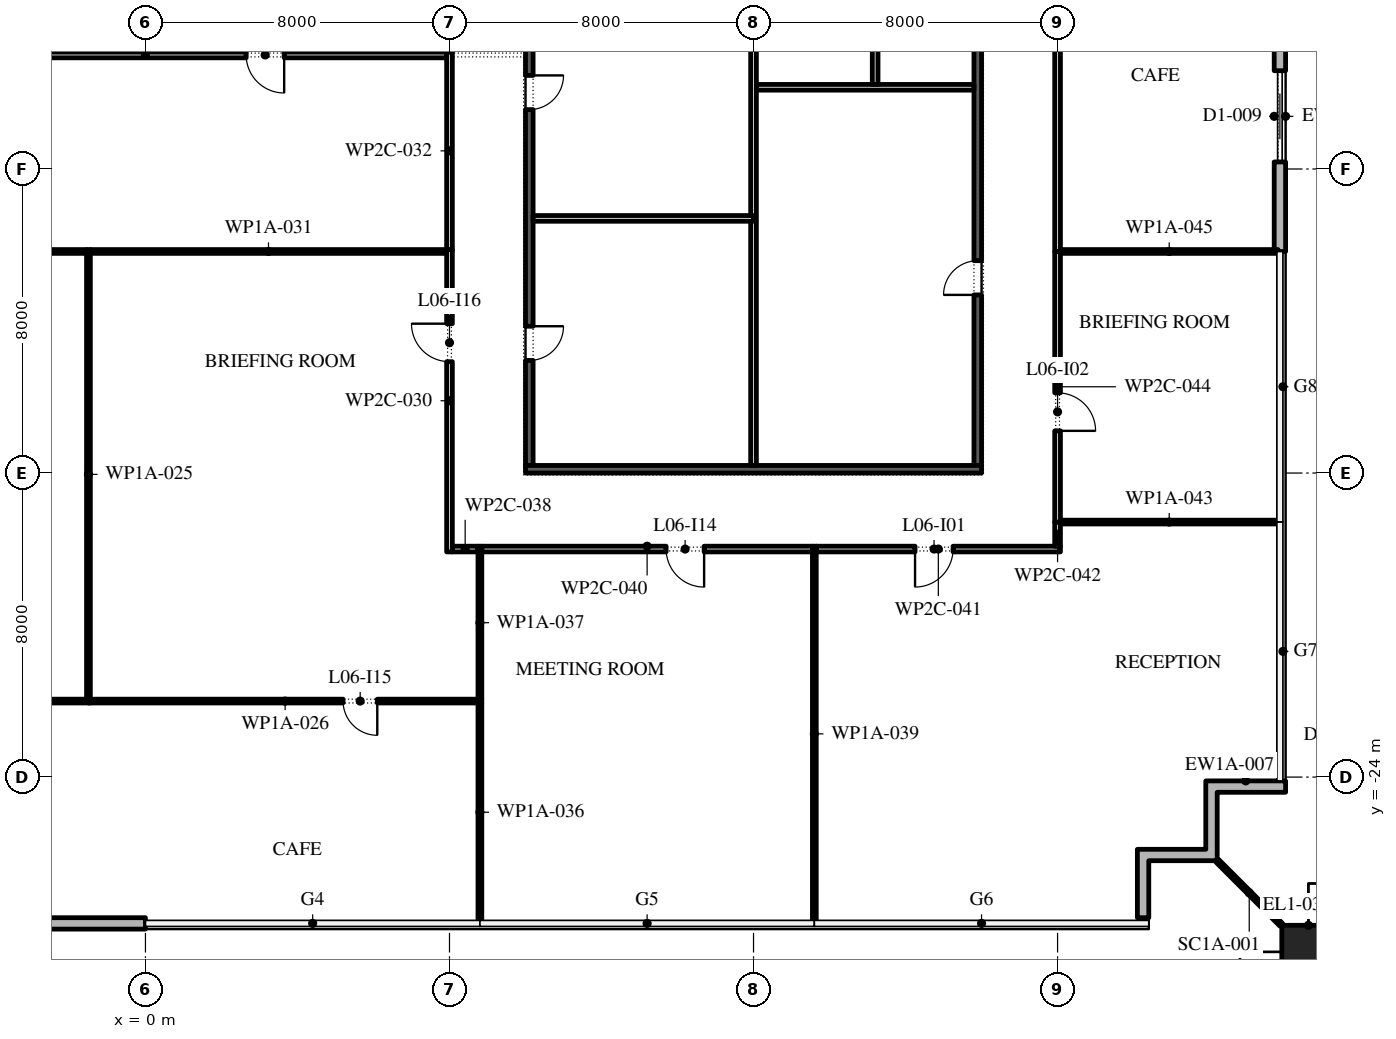
"""IFC4 building model, lengths in metres.
Left out: names, types, materials, properties, quantities, classifications, styles, units other than length and angle.
Written with IfcOpenShell. Run it as: python <this file> out.ifc"""

import sys

from ifc_helpers import new_model, si_unit, direction, frame, frame_2d, origin, origin_2d, place, context, subcontext, project, spatial, polyline, rectangle, outline, extrude, element, fill, save


model = new_model("IFC4")
c1 = context("Model", 3, precision=1e-05, world=origin(), true_north=direction((0.0, 1.0)))
c2 = subcontext(c1, "Body", "Model", "MODEL_VIEW")
j1 = project(units=[si_unit("LENGTHUNIT", "METRE"), si_unit("PLANEANGLEUNIT", "RADIAN")], contexts=[c1])
p1 = place(None, origin())
s1 = spatial("IfcSite", under=j1, at=p1, CompositionType="ELEMENT")
p2 = place(p1, origin())
s2 = spatial("IfcBuilding", under=s1, at=p2, CompositionType="ELEMENT")
p3 = place(p2, frame((0.0, 0.0, 33.6)))
s3 = spatial("IfcBuildingStorey", under=s2, at=p3, CompositionType="ELEMENT", Elevation=33.6)
p4 = place(p3, frame((30.6, -28.6, 0.0), z_axis=(0.0, 0.0, 1.0), x_axis=(1.0, 0.0, 0.0)))
e1 = element("IfcColumn", 1, at=p4, inside=s3, PredefinedType="COLUMN", context=c2, shape_type="SweptSolid", body=[
    extrude(rectangle(XDim=1.4, YDim=1.4, at=origin_2d()), origin(), (0.0, 0.0, 1.0), 6.0),
])
p5 = place(p3, frame((-8.8, -27.85, 0.0), z_axis=(0.0, 0.0, 1.0), x_axis=(1.0, 0.0, 0.0)))
e2 = element("IfcWall", 2, at=p5, inside=s3, PredefinedType="STANDARD", context=c2, shape_type="SweptSolid", body=[
    extrude(rectangle(XDim=8.8, YDim=0.3, at=frame_2d((4.4, 0.0))), origin(), (0.0, 0.0, 1.0), 5.8),
])
p6 = place(p5, frame((3.2, 0.0, 0.0)))
e3 = element("IfcOpeningElement", 3, at=p6, cuts=e2, PredefinedType="OPENING", context=c2, shape_type="SweptSolid", body=[
    extrude(rectangle(XDim=2.4, YDim=3.5, at=frame_2d((1.2, 1.75))), frame((0.0, 0.16, 0.0), z_axis=(0.0, -1.0, 0.0), x_axis=(1.0, 0.0, 0.0)), (0.0, 0.0, 1.0), 0.32),
])
p7 = place(p3, frame((29.85, -10.171, 0.0), z_axis=(0.0, 0.0, 1.0), x_axis=(0.0, 1.0, 0.0)))
e4 = element("IfcWall", 4, at=p7, inside=s3, PredefinedType="STANDARD", context=c2, shape_type="SweptSolid", body=[
    extrude(rectangle(XDim=7.114, YDim=0.3, at=frame_2d((3.557, 0.0))), origin(), (0.0, 0.0, 1.0), 5.8),
])
p8 = place(p7, frame((2.357, 0.0, 0.0)))
e5 = element("IfcOpeningElement", 5, at=p8, cuts=e4, PredefinedType="OPENING", context=c2, shape_type="SweptSolid", body=[
    extrude(rectangle(XDim=2.4, YDim=3.5, at=frame_2d((1.2, 1.75))), frame((0.0, 0.16, 0.0), z_axis=(0.0, -1.0, 0.0), x_axis=(1.0, 0.0, 0.0)), (0.0, 0.0, 1.0), 0.32),
])
p9 = place(p3, origin())
e6 = element("IfcWall", 6, at=p9, inside=s3, PredefinedType="STANDARD", context=c2, shape_type="SweptSolid", body=[
    extrude(outline(polyline([(27.9, -25.9), (27.9, -24.1), (30.0, -24.1), (30.0, -24.4), (28.2, -24.4), (28.2, -26.2), (26.4, -26.2), (26.4, -27.7), (26.1, -27.7), (26.1, -25.9), (27.9, -25.9)])), origin(), (0.0, 0.0, 1.0), 5.8),
])
p10 = place(p3, frame((28.2, -26.2, 0.0), z_axis=(0.0, 0.0, 1.0), x_axis=(0.707106781187, -0.707106781187, 0.0)))
e7 = element("IfcWall", 7, at=p10, inside=s3, PredefinedType="STANDARD", context=c2, shape_type="SweptSolid", body=[
    extrude(rectangle(XDim=2.385, YDim=0.1, at=frame_2d((1.192, 0.0))), origin(), (0.0, 0.0, 1.0), 5.8),
])
p11 = place(p3, frame((21.9, -15.8, 0.0), z_axis=(0.0, 0.0, 1.0), x_axis=(0.0, 1.0, 0.0)))
e8 = element("IfcWall", 8, at=p11, inside=s3, PredefinedType="SHEAR", context=c2, shape_type="SweptSolid", body=[
    extrude(rectangle(XDim=13.05, YDim=0.2, at=frame_2d((6.525, 0.0))), origin(), (0.0, 0.0, 1.0), 5.8),
])
p12 = place(p11, frame((4.488, 0.0, 0.0)))
e9 = element("IfcOpeningElement", 9, at=p12, cuts=e8, PredefinedType="OPENING", context=c2, shape_type="SweptSolid", body=[
    extrude(rectangle(XDim=0.9, YDim=2.1, at=frame_2d((0.45, 1.05))), frame((0.0, 0.11, 0.0), z_axis=(0.0, -1.0, 0.0), x_axis=(1.0, 0.0, 0.0)), (0.0, 0.0, 1.0), 0.22),
])
p13 = place(p11, frame((11.038, 0.0, 0.0)))
e10 = element("IfcOpeningElement", 10, at=p13, cuts=e8, PredefinedType="OPENING", context=c2, shape_type="SweptSolid", body=[
    extrude(rectangle(XDim=1.0, YDim=2.1, at=frame_2d((0.5, 1.05))), frame((0.0, 0.11, 0.0), z_axis=(0.0, -1.0, 0.0), x_axis=(1.0, 0.0, 0.0)), (0.0, 0.0, 1.0), 0.22),
])
p14 = place(p3, frame((10.1, -15.8, 0.0), z_axis=(0.0, 0.0, 1.0), x_axis=(0.0, 1.0, 0.0)))
e11 = element("IfcWall", 11, at=p14, inside=s3, PredefinedType="SHEAR", context=c2, shape_type="SweptSolid", body=[
    extrude(rectangle(XDim=13.05, YDim=0.2, at=frame_2d((6.525, 0.0))), origin(), (0.0, 0.0, 1.0), 5.8),
])
p15 = place(p14, frame((2.762, 0.0, 0.0)))
e12 = element("IfcOpeningElement", 12, at=p15, cuts=e11, PredefinedType="OPENING", context=c2, shape_type="SweptSolid", body=[
    extrude(rectangle(XDim=0.9, YDim=2.1, at=frame_2d((0.45, 1.05))), frame((0.0, 0.11, 0.0), z_axis=(0.0, -1.0, 0.0), x_axis=(1.0, 0.0, 0.0)), (0.0, 0.0, 1.0), 0.22),
])
p16 = place(p14, frame((9.363, 0.0, 0.0)))
e13 = element("IfcOpeningElement", 13, at=p16, cuts=e11, PredefinedType="OPENING", context=c2, shape_type="SweptSolid", body=[
    extrude(rectangle(XDim=0.9, YDim=2.1, at=frame_2d((0.45, 1.05))), frame((0.0, 0.11, 0.0), z_axis=(0.0, -1.0, 0.0), x_axis=(1.0, 0.0, 0.0)), (0.0, 0.0, 1.0), 0.22),
])
p17 = place(p3, frame((10.0, -15.9, 0.0), z_axis=(0.0, 0.0, 1.0), x_axis=(1.0, 0.0, 0.0)))
e14 = element("IfcWall", 14, at=p17, inside=s3, PredefinedType="SHEAR", context=c2, shape_type="SweptSolid", body=[
    extrude(rectangle(XDim=12.0, YDim=0.2, at=frame_2d((6.0, 0.0))), origin(), (0.0, 0.0, 1.0), 5.8),
])
p18 = place(p3, frame((16.0, -15.8, 0.0), z_axis=(0.0, 0.0, 1.0), x_axis=(0.0, 1.0, 0.0)))
e15 = element("IfcWall", 15, at=p18, inside=s3, PredefinedType="PARTITIONING", context=c2, shape_type="SweptSolid", body=[
    extrude(rectangle(XDim=13.05, YDim=0.15, at=frame_2d((6.525, 0.0))), origin(), (0.0, 0.0, 1.0), 5.8),
])
p19 = place(p18, frame((11.087, 0.0, 0.0)))
e16 = element("IfcOpeningElement", 16, at=p19, cuts=e15, PredefinedType="OPENING", context=c2, shape_type="SweptSolid", body=[
    extrude(rectangle(XDim=0.9, YDim=2.1, at=frame_2d((0.45, 1.05))), frame((0.0, 0.085, 0.0), z_axis=(0.0, -1.0, 0.0), x_axis=(1.0, 0.0, 0.0)), (0.0, 0.0, 1.0), 0.17),
])
p20 = place(p3, frame((10.2, -9.3, 0.0), z_axis=(0.0, 0.0, 1.0), x_axis=(1.0, 0.0, 0.0)))
e17 = element("IfcWall", 17, at=p20, inside=s3, PredefinedType="PARTITIONING", context=c2, shape_type="SweptSolid", body=[
    extrude(rectangle(XDim=5.8, YDim=0.15, at=frame_2d((2.9, 0.0))), origin(), (0.0, 0.0, 1.0), 5.8),
])
p21 = place(p3, frame((16.075, -5.85, 0.0), z_axis=(0.0, 0.0, 1.0), x_axis=(1.0, 0.0, 0.0)))
e18 = element("IfcWall", 18, at=p21, inside=s3, PredefinedType="PARTITIONING", context=c2, shape_type="SweptSolid", body=[
    extrude(rectangle(XDim=5.725, YDim=0.15, at=frame_2d((2.863, 0.0))), origin(), (0.0, 0.0, 1.0), 5.8),
])
p22 = place(p3, frame((19.2, -5.775, 0.0), z_axis=(0.0, 0.0, 1.0), x_axis=(0.0, 1.0, 0.0)))
e19 = element("IfcWall", 19, at=p22, inside=s3, PredefinedType="PARTITIONING", context=c2, shape_type="SweptSolid", body=[
    extrude(rectangle(XDim=3.025, YDim=0.15, at=frame_2d((1.512, 0.0))), origin(), (0.0, 0.0, 1.0), 5.8),
])
p23 = place(p3, frame((-8.75, -22.0, 0.0), z_axis=(0.0, 0.0, 1.0), x_axis=(1.0, 0.0, 0.0)))
e20 = element("IfcWall", 20, at=p23, inside=s3, PredefinedType="PARTITIONING", context=c2, shape_type="SweptSolid", body=[
    extrude(rectangle(XDim=7.3, YDim=0.1, at=frame_2d((3.65, 0.0))), origin(), (0.0, 0.0, 1.0), 5.8),
])
p24 = place(p3, frame((-1.5, -21.95, 0.0), z_axis=(0.0, 0.0, 1.0), x_axis=(0.0, 1.0, 0.0)))
e21 = element("IfcWall", 21, at=p24, inside=s3, PredefinedType="PARTITIONING", context=c2, shape_type="SweptSolid", body=[
    extrude(rectangle(XDim=11.83, YDim=0.1, at=frame_2d((5.915, 0.0))), origin(), (0.0, 0.0, 1.0), 5.8),
])
p25 = place(p3, frame((-1.5, -22.0, 0.0), z_axis=(0.0, 0.0, 1.0), x_axis=(1.0, 0.0, 0.0)))
e22 = element("IfcWall", 22, at=p25, inside=s3, PredefinedType="PARTITIONING", context=c2, shape_type="SweptSolid", body=[
    extrude(rectangle(XDim=10.35, YDim=0.1, at=frame_2d((5.175, 0.0))), origin(), (0.0, 0.0, 1.0), 5.8),
])
p26 = place(p25, frame((6.7, 0.0, 0.0)))
e23 = element("IfcOpeningElement", 23, at=p26, cuts=e22, PredefinedType="OPENING", context=c2, shape_type="SweptSolid", body=[
    extrude(rectangle(XDim=0.9, YDim=2.1, at=frame_2d((0.45, 1.05))), frame((0.0, 0.06, 0.0), z_axis=(0.0, -1.0, 0.0), x_axis=(1.0, 0.0, 0.0)), (0.0, 0.0, 1.0), 0.12),
])
p27 = place(p3, frame((-1.55, -10.17, 0.0), z_axis=(0.0, 0.0, 1.0), x_axis=(-1.0, 0.0, 0.0)))
e24 = element("IfcWall", 24, at=p27, inside=s3, PredefinedType="PARTITIONING", context=c2, shape_type="SweptSolid", body=[
    extrude(rectangle(XDim=6.375, YDim=0.1, at=frame_2d((3.188, 0.0))), origin(), (0.0, 0.0, 1.0), 5.8),
])
p28 = place(p3, frame((8.0, -18.075, 0.0), z_axis=(0.0, 0.0, 1.0), x_axis=(0.0, 1.0, 0.0)))
e25 = element("IfcWall", 25, at=p28, inside=s3, PredefinedType="PARTITIONING", context=c2, shape_type="SweptSolid", body=[
    extrude(rectangle(XDim=7.955, YDim=0.15, at=frame_2d((3.978, 0.0))), origin(), (0.0, 0.0, 1.0), 5.8),
])
p29 = place(p28, frame((5.005, 0.0, 0.0)))
e26 = element("IfcOpeningElement", 26, at=p29, cuts=e25, PredefinedType="OPENING", context=c2, shape_type="SweptSolid", body=[
    extrude(rectangle(XDim=1.0, YDim=2.1, at=frame_2d((0.5, 1.05))), frame((0.0, 0.085, 0.0), z_axis=(0.0, -1.0, 0.0), x_axis=(1.0, 0.0, 0.0)), (0.0, 0.0, 1.0), 0.17),
])
p30 = place(p3, frame((7.925, -10.17, 0.0), z_axis=(0.0, 0.0, 1.0), x_axis=(-1.0, 0.0, 0.0)))
e27 = element("IfcWall", 27, at=p30, inside=s3, PredefinedType="PARTITIONING", context=c2, shape_type="SweptSolid", body=[
    extrude(rectangle(XDim=9.375, YDim=0.1, at=frame_2d((4.688, 0.0))), origin(), (0.0, 0.0, 1.0), 5.8),
])
p31 = place(p3, frame((8.0, -10.12, 0.0), z_axis=(0.0, 0.0, 1.0), x_axis=(0.0, 1.0, 0.0)))
e28 = element("IfcWall", 28, at=p31, inside=s3, PredefinedType="PARTITIONING", context=c2, shape_type="SweptSolid", body=[
    extrude(rectangle(XDim=5.195, YDim=0.15, at=frame_2d((2.598, 0.0))), origin(), (0.0, 0.0, 1.0), 5.8),
])
p32 = place(p3, frame((7.925, -5.0, 0.0), z_axis=(0.0, 0.0, 1.0), x_axis=(-1.0, 0.0, 0.0)))
e29 = element("IfcWall", 29, at=p32, inside=s3, PredefinedType="PARTITIONING", context=c2, shape_type="SweptSolid", body=[
    extrude(rectangle(XDim=15.85, YDim=0.15, at=frame_2d((7.925, 0.0))), origin(), (0.0, 0.0, 1.0), 5.8),
])
p33 = place(p32, frame((4.275, 0.0, 0.0)))
e30 = element("IfcOpeningElement", 30, at=p33, cuts=e29, PredefinedType="OPENING", context=c2, shape_type="SweptSolid", body=[
    extrude(rectangle(XDim=1.0, YDim=2.1, at=frame_2d((0.5, 1.05))), frame((0.0, 0.085, 0.0), z_axis=(0.0, -1.0, 0.0), x_axis=(1.0, 0.0, 0.0)), (0.0, 0.0, 1.0), 0.17),
])
p34 = place(p3, frame((8.8, -27.8, 0.0), z_axis=(0.0, 0.0, 1.0), x_axis=(0.0, 1.0, 0.0)))
e31 = element("IfcWall", 31, at=p34, inside=s3, PredefinedType="PARTITIONING", context=c2, shape_type="SweptSolid", body=[
    extrude(rectangle(XDim=5.75, YDim=0.1, at=frame_2d((2.875, 0.0))), origin(), (0.0, 0.0, 1.0), 5.8),
])
p35 = place(p3, frame((8.8, -21.95, 0.0), z_axis=(0.0, 0.0, 1.0), x_axis=(0.0, 1.0, 0.0)))
e32 = element("IfcWall", 32, at=p35, inside=s3, PredefinedType="PARTITIONING", context=c2, shape_type="SweptSolid", body=[
    extrude(rectangle(XDim=4.025, YDim=0.1, at=frame_2d((2.012, 0.0))), origin(), (0.0, 0.0, 1.0), 5.8),
])
p36 = place(p3, frame((8.75, -18.0, 0.0), z_axis=(0.0, 0.0, 1.0), x_axis=(-1.0, 0.0, 0.0)))
e33 = element("IfcWall", 33, at=p36, inside=s3, PredefinedType="PARTITIONING", context=c2, shape_type="SweptSolid", body=[
    extrude(rectangle(XDim=0.675, YDim=0.15, at=frame_2d((0.337, 0.0))), origin(), (0.0, 0.0, 1.0), 5.8),
])
p37 = place(p3, frame((17.6, -27.8, 0.0), z_axis=(0.0, 0.0, 1.0), x_axis=(0.0, 1.0, 0.0)))
e34 = element("IfcWall", 34, at=p37, inside=s3, PredefinedType="PARTITIONING", context=c2, shape_type="SweptSolid", body=[
    extrude(rectangle(XDim=9.875, YDim=0.1, at=frame_2d((4.938, 0.0))), origin(), (0.0, 0.0, 1.0), 5.8),
])
p38 = place(p3, frame((17.55, -18.0, 0.0), z_axis=(0.0, 0.0, 1.0), x_axis=(-1.0, 0.0, 0.0)))
e35 = element("IfcWall", 35, at=p38, inside=s3, PredefinedType="PARTITIONING", context=c2, shape_type="SweptSolid", body=[
    extrude(rectangle(XDim=8.7, YDim=0.15, at=frame_2d((4.35, 0.0))), origin(), (0.0, 0.0, 1.0), 5.8),
])
p39 = place(p38, frame((2.85, 0.0, 0.0)))
e36 = element("IfcOpeningElement", 36, at=p39, cuts=e35, PredefinedType="OPENING", context=c2, shape_type="SweptSolid", body=[
    extrude(rectangle(XDim=1.0, YDim=2.1, at=frame_2d((0.5, 1.05))), frame((0.0, 0.085, 0.0), z_axis=(0.0, -1.0, 0.0), x_axis=(1.0, 0.0, 0.0)), (0.0, 0.0, 1.0), 0.17),
])
p40 = place(p3, frame((24.075, -18.0, 0.0), z_axis=(0.0, 0.0, 1.0), x_axis=(-1.0, 0.0, 0.0)))
e37 = element("IfcWall", 37, at=p40, inside=s3, PredefinedType="PARTITIONING", context=c2, shape_type="SweptSolid", body=[
    extrude(rectangle(XDim=6.425, YDim=0.15, at=frame_2d((3.212, 0.0))), origin(), (0.0, 0.0, 1.0), 5.8),
])
p41 = place(p40, frame((2.825, 0.0, 0.0)))
e38 = element("IfcOpeningElement", 38, at=p41, cuts=e37, PredefinedType="OPENING", context=c2, shape_type="SweptSolid", body=[
    extrude(rectangle(XDim=1.0, YDim=2.1, at=frame_2d((0.5, 1.05))), frame((0.0, 0.085, 0.0), z_axis=(0.0, -1.0, 0.0), x_axis=(1.0, 0.0, 0.0)), (0.0, 0.0, 1.0), 0.17),
])
p42 = place(p3, frame((24.0, -17.29, 0.0), z_axis=(0.0, 0.0, 1.0), x_axis=(0.0, -1.0, 0.0)))
e39 = element("IfcWall", 39, at=p42, inside=s3, PredefinedType="PARTITIONING", context=c2, shape_type="SweptSolid", body=[
    extrude(rectangle(XDim=0.635, YDim=0.15, at=frame_2d((0.317, 0.0))), origin(), (0.0, 0.0, 1.0), 5.8),
])
p43 = place(p3, frame((24.075, -17.29, 0.0), z_axis=(0.0, 0.0, 1.0), x_axis=(1.0, 0.0, 0.0)))
e40 = element("IfcWall", 40, at=p43, inside=s3, PredefinedType="PARTITIONING", context=c2, shape_type="SweptSolid", body=[
    extrude(rectangle(XDim=5.725, YDim=0.1, at=frame_2d((2.863, 0.0))), origin(), (0.0, 0.0, 1.0), 5.8),
])
p44 = place(p3, frame((24.0, -10.17, 0.0), z_axis=(0.0, 0.0, 1.0), x_axis=(0.0, -1.0, 0.0)))
e41 = element("IfcWall", 41, at=p44, inside=s3, PredefinedType="PARTITIONING", context=c2, shape_type="SweptSolid", body=[
    extrude(rectangle(XDim=7.12, YDim=0.15, at=frame_2d((3.56, 0.0))), origin(), (0.0, 0.0, 1.0), 5.8),
])
p45 = place(p44, frame((3.72, 0.0, 0.0)))
e42 = element("IfcOpeningElement", 42, at=p45, cuts=e41, PredefinedType="OPENING", context=c2, shape_type="SweptSolid", body=[
    extrude(rectangle(XDim=1.0, YDim=2.1, at=frame_2d((0.5, 1.05))), frame((0.0, 0.085, 0.0), z_axis=(0.0, -1.0, 0.0), x_axis=(1.0, 0.0, 0.0)), (0.0, 0.0, 1.0), 0.17),
])
p46 = place(p3, frame((24.075, -10.17, 0.0), z_axis=(0.0, 0.0, 1.0), x_axis=(1.0, 0.0, 0.0)))
e43 = element("IfcWall", 43, at=p46, inside=s3, PredefinedType="PARTITIONING", context=c2, shape_type="SweptSolid", body=[
    extrude(rectangle(XDim=5.725, YDim=0.1, at=frame_2d((2.863, 0.0))), origin(), (0.0, 0.0, 1.0), 5.8),
])
p47 = place(p3, frame((24.0, 4.11, 0.0), z_axis=(0.0, 0.0, 1.0), x_axis=(0.0, -1.0, 0.0)))
e44 = element("IfcWall", 44, at=p47, inside=s3, PredefinedType="PARTITIONING", context=c2, shape_type="SweptSolid", body=[
    extrude(rectangle(XDim=14.28, YDim=0.15, at=frame_2d((7.14, 0.0))), origin(), (0.0, 0.0, 1.0), 5.8),
])
p48 = place(p47, frame((6.63, 0.0, 0.0)))
e45 = element("IfcOpeningElement", 45, at=p48, cuts=e44, PredefinedType="OPENING", context=c2, shape_type="SweptSolid", body=[
    extrude(rectangle(XDim=1.0, YDim=2.1, at=frame_2d((0.5, 1.05))), frame((0.0, 0.085, 0.0), z_axis=(0.0, -1.0, 0.0), x_axis=(1.0, 0.0, 0.0)), (0.0, 0.0, 1.0), 0.17),
])
p49 = place(p8, origin())
e46 = element("IfcDoor", 46, at=p49, inside=s3, OperationType="DOUBLE_DOOR_SLIDING", PredefinedType="DOOR", context=c2, shape_type="SweptSolid", body=[
    extrude(rectangle(XDim=2.4, YDim=3.5, at=frame_2d((1.2, 1.75))), frame((0.0, 0.025, 0.0), z_axis=(0.0, -1.0, 0.0), x_axis=(1.0, 0.0, 0.0)), (0.0, 0.0, 1.0), 0.05),
])
fill(e5, e46)
p50 = place(p12, origin())
e47 = element("IfcDoor", 47, at=p50, inside=s3, OperationType="SINGLE_SWING_RIGHT", PredefinedType="DOOR", context=c2, shape_type="SweptSolid", body=[
    extrude(rectangle(XDim=0.9, YDim=2.1, at=frame_2d((0.45, 1.05))), frame((0.0, 0.1, 0.0), z_axis=(0.0, -1.0, 0.0), x_axis=(1.0, 0.0, 0.0)), (0.0, 0.0, 1.0), 0.05),
])
fill(e9, e47)
p51 = place(p15, frame((0.9, -0.15, 0.0), z_axis=(0.0, 0.0, 1.0), x_axis=(-1.0, 0.0, 0.0)))
e48 = element("IfcDoor", 48, at=p51, inside=s3, OperationType="SINGLE_SWING_RIGHT", PredefinedType="DOOR", context=c2, shape_type="SweptSolid", body=[
    extrude(rectangle(XDim=0.9, YDim=2.1, at=frame_2d((0.45, 1.05))), frame((0.0, -0.05, 0.0), z_axis=(0.0, -1.0, 0.0), x_axis=(1.0, 0.0, 0.0)), (0.0, 0.0, 1.0), 0.05),
])
fill(e12, e48)
p52 = place(p16, frame((0.9, -0.15, 0.0), z_axis=(0.0, 0.0, 1.0), x_axis=(-1.0, 0.0, 0.0)))
e49 = element("IfcDoor", 49, at=p52, inside=s3, OperationType="SINGLE_SWING_RIGHT", PredefinedType="DOOR", context=c2, shape_type="SweptSolid", body=[
    extrude(rectangle(XDim=0.9, YDim=2.1, at=frame_2d((0.45, 1.05))), frame((0.0, -0.05, 0.0), z_axis=(0.0, -1.0, 0.0), x_axis=(1.0, 0.0, 0.0)), (0.0, 0.0, 1.0), 0.05),
])
fill(e13, e49)
p53 = place(p41, origin())
e50 = element("IfcDoor", 50, at=p53, inside=s3, OperationType="SINGLE_SWING_LEFT", PredefinedType="DOOR", context=c2, shape_type="SweptSolid", body=[
    extrude(rectangle(XDim=1.0, YDim=2.1, at=frame_2d((0.5, 1.05))), frame((0.0, 0.025, 0.0), z_axis=(0.0, -1.0, 0.0), x_axis=(1.0, 0.0, 0.0)), (0.0, 0.0, 1.0), 0.05),
])
fill(e38, e50)
p54 = place(p45, origin())
e51 = element("IfcDoor", 51, at=p54, inside=s3, OperationType="SINGLE_SWING_LEFT", PredefinedType="DOOR", context=c2, shape_type="SweptSolid", body=[
    extrude(rectangle(XDim=1.0, YDim=2.1, at=frame_2d((0.5, 1.05))), frame((0.0, 0.025, 0.0), z_axis=(0.0, -1.0, 0.0), x_axis=(1.0, 0.0, 0.0)), (0.0, 0.0, 1.0), 0.05),
])
fill(e42, e51)
p55 = place(p33, origin())
e52 = element("IfcDoor", 52, at=p55, inside=s3, OperationType="SINGLE_SWING_RIGHT", PredefinedType="DOOR", context=c2, shape_type="SweptSolid", body=[
    extrude(rectangle(XDim=1.0, YDim=2.1, at=frame_2d((0.5, 1.05))), frame((0.0, 0.025, 0.0), z_axis=(0.0, -1.0, 0.0), x_axis=(1.0, 0.0, 0.0)), (0.0, 0.0, 1.0), 0.05),
])
fill(e30, e52)
p56 = place(p39, origin())
e53 = element("IfcDoor", 53, at=p56, inside=s3, OperationType="SINGLE_SWING_RIGHT", PredefinedType="DOOR", context=c2, shape_type="SweptSolid", body=[
    extrude(rectangle(XDim=1.0, YDim=2.1, at=frame_2d((0.5, 1.05))), frame((0.0, 0.025, 0.0), z_axis=(0.0, -1.0, 0.0), x_axis=(1.0, 0.0, 0.0)), (0.0, 0.0, 1.0), 0.05),
])
fill(e36, e53)
p57 = place(p26, frame((0.9, 0.0, 0.0), z_axis=(0.0, 0.0, 1.0), x_axis=(-1.0, 0.0, 0.0)))
e54 = element("IfcDoor", 54, at=p57, inside=s3, OperationType="SINGLE_SWING_RIGHT", PredefinedType="DOOR", context=c2, shape_type="SweptSolid", body=[
    extrude(rectangle(XDim=0.9, YDim=2.1, at=frame_2d((0.45, 1.05))), frame((0.0, 0.025, 0.0), z_axis=(0.0, -1.0, 0.0), x_axis=(1.0, 0.0, 0.0)), (0.0, 0.0, 1.0), 0.05),
])
fill(e23, e54)
p58 = place(p29, origin())
e55 = element("IfcDoor", 55, at=p58, inside=s3, OperationType="SINGLE_SWING_LEFT", PredefinedType="DOOR", context=c2, shape_type="SweptSolid", body=[
    extrude(rectangle(XDim=1.0, YDim=2.1, at=frame_2d((0.5, 1.05))), frame((0.0, 0.025, 0.0), z_axis=(0.0, -1.0, 0.0), x_axis=(1.0, 0.0, 0.0)), (0.0, 0.0, 1.0), 0.05),
])
fill(e26, e55)
save(model, sys.argv[1])
